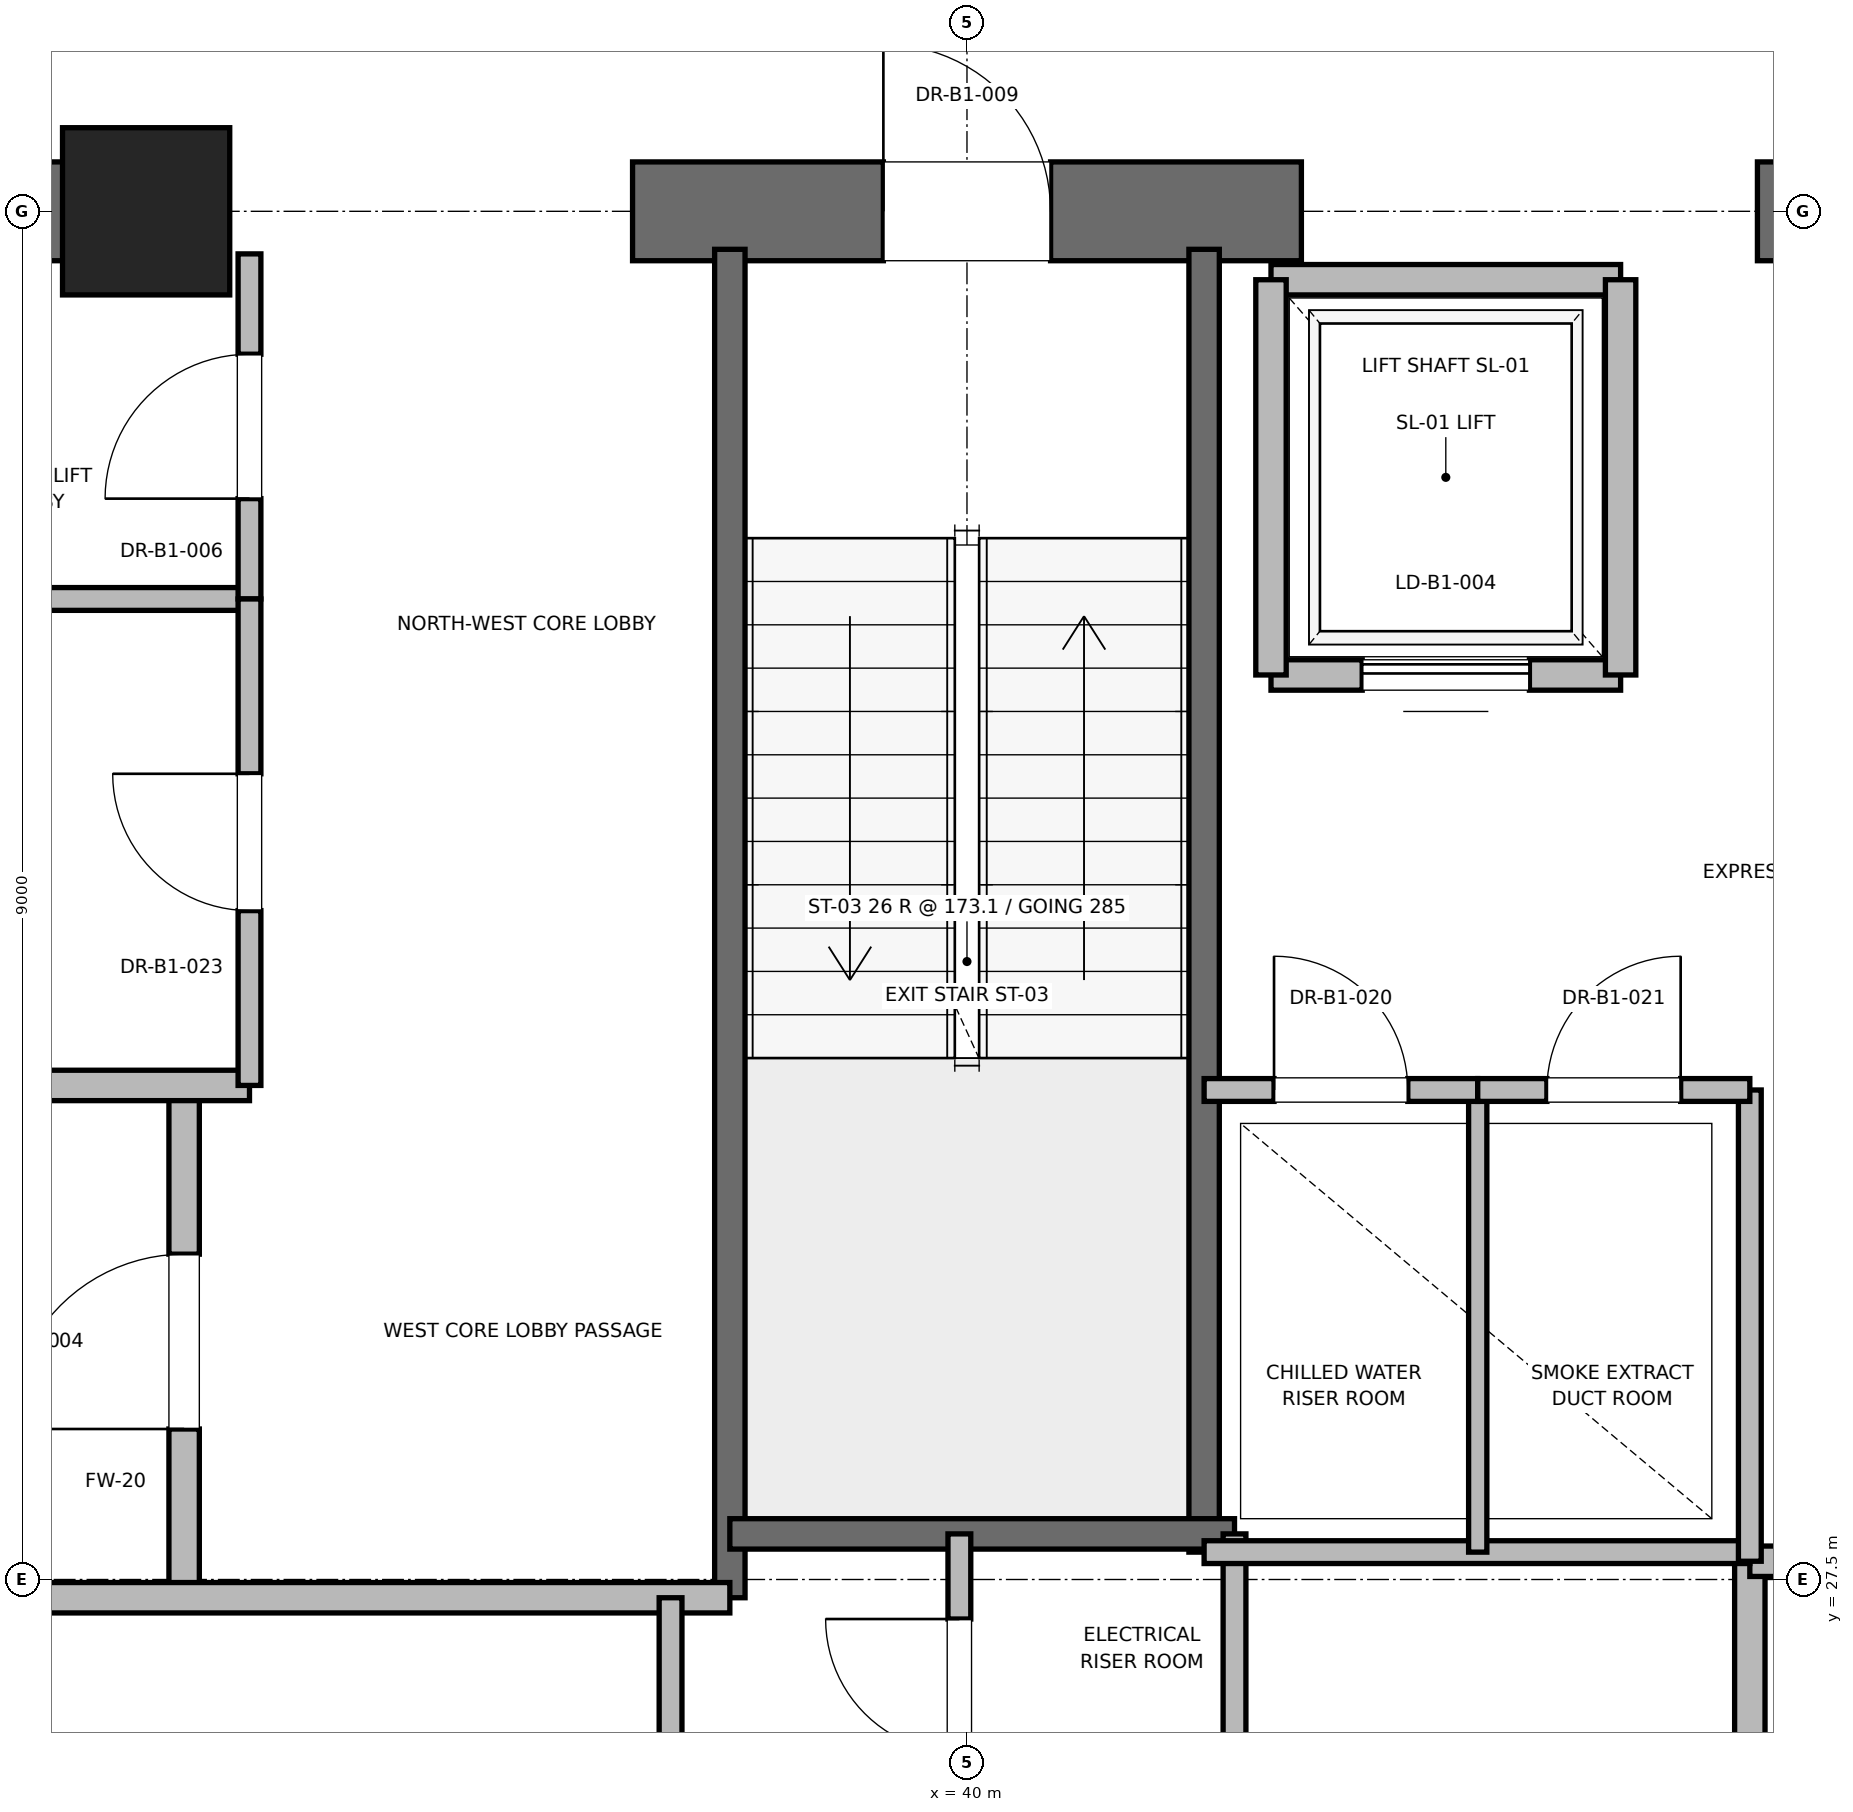
"""IFC4 building model, lengths in metres.
Left out: names, types, materials, properties, quantities, classifications, styles, units other than length and angle.
Written with IfcOpenShell. Run it as: python <this file> out.ifc"""

import sys

from ifc_helpers import new_model, si_unit, direction, frame, frame_2d, origin, origin_2d, place, context, subcontext, project, spatial, rectangle, extrude, element, fill, save


model = new_model("IFC4")
c1 = context("Model", 3, precision=1e-05, world=origin(), true_north=direction((0.0, 1.0)))
c2 = subcontext(c1, "Body", "Model", "MODEL_VIEW")
j1 = project(units=[si_unit("LENGTHUNIT", "METRE"), si_unit("PLANEANGLEUNIT", "RADIAN")], contexts=[c1])
p1 = place(None, origin())
s1 = spatial("IfcSite", under=j1, at=p1, CompositionType="ELEMENT")
p2 = place(p1, origin())
s2 = spatial("IfcBuilding", under=s1, at=p2, CompositionType="ELEMENT")
p3 = place(p2, frame((0.0, 0.0, -4.5)))
s3 = spatial("IfcBuildingStorey", under=s2, at=p3, CompositionType="ELEMENT", Elevation=-4.5)
p4 = place(p3, frame((34.6, 36.5, 0.0), z_axis=(0.0, 0.0, 1.0), x_axis=(1.0, 0.0, 0.0)))
e1 = element("IfcColumn", 1, at=p4, inside=s3, PredefinedType="PILASTER", context=c2, shape_type="SweptSolid", body=[
    extrude(rectangle(XDim=1.1, YDim=1.1, at=origin_2d()), origin(), (0.0, 0.0, 1.0), 4.5),
])
p5 = place(p3, frame((29.0, 36.5, 0.0), z_axis=(0.0, 0.0, 1.0), x_axis=(1.0, 0.0, 0.0)))
e2 = element("IfcWall", 2, at=p5, inside=s3, PredefinedType="SHEAR", context=c2, shape_type="SweptSolid", body=[
    extrude(rectangle(XDim=5.8, YDim=0.65, at=frame_2d((2.9, 0.0))), origin(), (0.0, 0.0, 1.0), 4.22),
])
p6 = place(p3, frame((37.8, 36.5, 0.0), z_axis=(0.0, 0.0, 1.0), x_axis=(1.0, 0.0, 0.0)))
e3 = element("IfcWall", 3, at=p6, inside=s3, PredefinedType="SHEAR", context=c2, shape_type="SweptSolid", body=[
    extrude(rectangle(XDim=4.4, YDim=0.65, at=frame_2d((2.2, 0.0))), origin(), (0.0, 0.0, 1.0), 4.22),
])
p7 = place(p6, frame((1.65, 0.0, 0.0)))
e4 = element("IfcOpeningElement", 4, at=p7, cuts=e3, PredefinedType="OPENING", context=c2, shape_type="SweptSolid", body=[
    extrude(rectangle(XDim=1.1, YDim=2.15, at=frame_2d((0.55, 1.075))), frame((0.0, 0.325, 0.0), z_axis=(0.0, -1.0, 0.0), x_axis=(1.0, 0.0, 0.0)), (0.0, 0.0, 1.0), 0.65),
])
p8 = place(p3, frame((45.2, 36.5, 0.0), z_axis=(0.0, 0.0, 1.0), x_axis=(1.0, 0.0, 0.0)))
e5 = element("IfcWall", 5, at=p8, inside=s3, PredefinedType="SHEAR", context=c2, shape_type="SweptSolid", body=[
    extrude(rectangle(XDim=5.8, YDim=0.65, at=frame_2d((2.9, 0.0))), origin(), (0.0, 0.0, 1.0), 4.22),
])
p9 = place(p3, frame((38.44, 27.38, 0.0), z_axis=(0.0, 0.0, 1.0), x_axis=(0.0, 1.0, 0.0)))
e6 = element("IfcWall", 6, at=p9, inside=s3, PredefinedType="SOLIDWALL", context=c2, shape_type="SweptSolid", body=[
    extrude(rectangle(XDim=8.87, YDim=0.2, at=frame_2d((4.435, 0.0))), origin(), (0.0, 0.0, 1.0), 4.22),
])
p10 = place(p3, frame((41.56, 27.68, 0.0), z_axis=(0.0, 0.0, 1.0), x_axis=(0.0, 1.0, 0.0)))
e7 = element("IfcWall", 7, at=p10, inside=s3, PredefinedType="SOLIDWALL", context=c2, shape_type="SweptSolid", body=[
    extrude(rectangle(XDim=8.57, YDim=0.2, at=frame_2d((4.285, 0.0))), origin(), (0.0, 0.0, 1.0), 4.22),
])
p11 = place(p3, frame((38.44, 27.8, 0.0), z_axis=(0.0, 0.0, 1.0), x_axis=(1.0, 0.0, 0.0)))
e8 = element("IfcWall", 8, at=p11, inside=s3, PredefinedType="SOLIDWALL", context=c2, shape_type="SweptSolid", body=[
    extrude(rectangle(XDim=3.32, YDim=0.2, at=frame_2d((1.66, 0.0))), origin(), (0.0, 0.0, 1.0), 4.22),
])
p12 = place(p3, frame((34.85, 27.38, 0.0), z_axis=(0.0, 0.0, 1.0), x_axis=(0.0, 1.0, 0.0)))
e9 = element("IfcWall", 9, at=p12, inside=s3, PredefinedType="PARTITIONING", context=c2, shape_type="SweptSolid", body=[
    extrude(rectangle(XDim=3.37, YDim=0.2, at=frame_2d((1.685, 0.0))), origin(), (0.0, 0.0, 1.0), 4.22),
])
p13 = place(p12, frame((1.11, 0.0, 0.0)))
e10 = element("IfcOpeningElement", 10, at=p13, cuts=e9, PredefinedType="OPENING", context=c2, shape_type="SweptSolid", body=[
    extrude(rectangle(XDim=1.15, YDim=2.2, at=frame_2d((0.575, 1.1))), frame((0.0, 0.1, 0.0), z_axis=(0.0, -1.0, 0.0), x_axis=(1.0, 0.0, 0.0)), (0.0, 0.0, 1.0), 0.2),
])
p14 = place(p3, frame((32.82, 27.38, 0.0), z_axis=(0.0, 0.0, 1.0), x_axis=(1.0, 0.0, 0.0)))
e11 = element("IfcWall", 11, at=p14, inside=s3, PredefinedType="PARTITIONING", context=c2, shape_type="SweptSolid", body=[
    extrude(rectangle(XDim=5.62, YDim=0.2, at=frame_2d((2.81, 0.0))), origin(), (0.0, 0.0, 1.0), 4.22),
])
p15 = place(p3, frame((32.15, 30.75, 0.0), z_axis=(0.0, 0.0, 1.0), x_axis=(1.0, 0.0, 0.0)))
e12 = element("IfcWall", 12, at=p15, inside=s3, PredefinedType="PARTITIONING", context=c2, shape_type="SweptSolid", body=[
    extrude(rectangle(XDim=3.13, YDim=0.2, at=frame_2d((1.565, 0.0))), origin(), (0.0, 0.0, 1.0), 4.22),
])
p16 = place(p3, frame((45.15, 24.25, 0.0), z_axis=(0.0, 0.0, 1.0), x_axis=(0.0, 1.0, 0.0)))
e13 = element("IfcWall", 13, at=p16, inside=s3, PredefinedType="PARTITIONING", context=c2, shape_type="SweptSolid", body=[
    extrude(rectangle(XDim=3.37, YDim=0.2, at=frame_2d((1.685, 0.0))), origin(), (0.0, 0.0, 1.0), 4.22),
])
p17 = place(p3, frame((45.15, 27.62, 0.0), z_axis=(0.0, 0.0, 1.0), x_axis=(1.0, 0.0, 0.0)))
e14 = element("IfcWall", 14, at=p17, inside=s3, PredefinedType="PARTITIONING", context=c2, shape_type="SweptSolid", body=[
    extrude(rectangle(XDim=2.03, YDim=0.2, at=frame_2d((1.015, 0.0))), origin(), (0.0, 0.0, 1.0), 4.22),
])
p18 = place(p17, frame((0.44, 0.0, 0.0)))
e15 = element("IfcOpeningElement", 15, at=p18, cuts=e14, PredefinedType="OPENING", context=c2, shape_type="SweptSolid", body=[
    extrude(rectangle(XDim=1.15, YDim=2.2, at=frame_2d((0.575, 1.1))), frame((0.0, 0.1, 0.0), z_axis=(0.0, -1.0, 0.0), x_axis=(1.0, 0.0, 0.0)), (0.0, 0.0, 1.0), 0.2),
])
p19 = place(p3, frame((42.0, 33.45, 0.0), z_axis=(0.0, 0.0, 1.0), x_axis=(1.0, 0.0, 0.0)))
e16 = element("IfcWall", 16, at=p19, inside=s3, PredefinedType="SOLIDWALL", context=c2, shape_type="SweptSolid", body=[
    extrude(rectangle(XDim=2.3, YDim=0.2, at=frame_2d((1.15, 0.0))), origin(), (0.0, 0.0, 1.0), 4.22),
])
p20 = place(p19, frame((0.6, 0.0, 0.0)))
e17 = element("IfcOpeningElement", 17, at=p20, cuts=e16, PredefinedType="OPENING", context=c2, shape_type="SweptSolid", body=[
    extrude(rectangle(XDim=1.1, YDim=2.2, at=frame_2d((0.55, 1.1))), frame((0.0, 0.1, 0.0), z_axis=(0.0, -1.0, 0.0), x_axis=(1.0, 0.0, 0.0)), (0.0, 0.0, 1.0), 0.2),
])
p21 = place(p3, frame((44.3, 36.05, 0.0), z_axis=(0.0, 0.0, 1.0), x_axis=(-1.0, 0.0, 0.0)))
e18 = element("IfcWall", 18, at=p21, inside=s3, PredefinedType="SOLIDWALL", context=c2, shape_type="SweptSolid", body=[
    extrude(rectangle(XDim=2.3, YDim=0.2, at=frame_2d((1.15, 0.0))), origin(), (0.0, 0.0, 1.0), 3.0),
])
for number, where, z_axis, x_axis in (
    (19, (42.0, 36.05, 0.0), (0.0, 0.0, 1.0), (0.0, -1.0, 0.0)),
    (20, (44.3, 33.45, 0.0), (0.0, 0.0, 1.0), (0.0, 1.0, 0.0)),
):
    element("IfcWall", number, at=place(p3, frame(where, z_axis=z_axis, x_axis=x_axis)), inside=s3, PredefinedType="SOLIDWALL", context=c2, shape_type="SweptSolid", body=[
        extrude(rectangle(XDim=2.6, YDim=0.2, at=frame_2d((1.3, 0.0))), origin(), (0.0, 0.0, 1.0), 3.0),
    ])
p22 = place(p3, frame((41.76, 23.8, 0.0), z_axis=(0.0, 0.0, 1.0), x_axis=(0.0, 1.0, 0.0)))
e21 = element("IfcWall", 21, at=p22, inside=s3, PredefinedType="PARTITIONING", context=c2, shape_type="SweptSolid", body=[
    extrude(rectangle(XDim=4.0, YDim=0.15, at=frame_2d((2.0, 0.0))), origin(), (0.0, 0.0, 1.0), 2.85),
])
p23 = place(p3, frame((39.95, 25.8, 0.0), z_axis=(0.0, 0.0, 1.0), x_axis=(0.0, 1.0, 0.0)))
e22 = element("IfcWall", 22, at=p23, inside=s3, PredefinedType="PARTITIONING", context=c2, shape_type="SweptSolid", body=[
    extrude(rectangle(XDim=2.0, YDim=0.15, at=frame_2d((1.0, 0.0))), origin(), (0.0, 0.0, 1.0), 2.85),
])
p24 = place(p23, frame((0.56, 0.0, 0.0)))
e23 = element("IfcOpeningElement", 23, at=p24, cuts=e22, PredefinedType="OPENING", context=c2, shape_type="SweptSolid", body=[
    extrude(rectangle(XDim=0.88, YDim=2.1, at=frame_2d((0.44, 1.05))), frame((0.0, 0.075, 0.0), z_axis=(0.0, -1.0, 0.0), x_axis=(1.0, 0.0, 0.0)), (0.0, 0.0, 1.0), 0.15),
])
p25 = place(p3, frame((32.15, 33.95, 0.0), z_axis=(0.0, 0.0, 1.0), x_axis=(1.0, 0.0, 0.0)))
e24 = element("IfcWall", 24, at=p25, inside=s3, PredefinedType="PARTITIONING", context=c2, shape_type="SweptSolid", body=[
    extrude(rectangle(XDim=3.13, YDim=0.15, at=frame_2d((1.565, 0.0))), origin(), (0.0, 0.0, 1.0), 2.85),
])
p26 = place(p3, frame((35.28, 33.95, 0.0), z_axis=(0.0, 0.0, 1.0), x_axis=(0.0, 1.0, 0.0)))
e25 = element("IfcWall", 25, at=p26, inside=s3, PredefinedType="PARTITIONING", context=c2, shape_type="SweptSolid", body=[
    extrude(rectangle(XDim=2.27, YDim=0.15, at=frame_2d((1.135, 0.0))), origin(), (0.0, 0.0, 1.0), 2.85),
])
p27 = place(p26, frame((0.66, 0.0, 0.0)))
e26 = element("IfcOpeningElement", 26, at=p27, cuts=e25, PredefinedType="OPENING", context=c2, shape_type="SweptSolid", body=[
    extrude(rectangle(XDim=0.95, YDim=2.15, at=frame_2d((0.475, 1.075))), frame((0.0, 0.075, 0.0), z_axis=(0.0, -1.0, 0.0), x_axis=(1.0, 0.0, 0.0)), (0.0, 0.0, 1.0), 0.15),
])
p28 = place(p3, frame((35.28, 30.75, 0.0), z_axis=(0.0, 0.0, 1.0), x_axis=(0.0, 1.0, 0.0)))
e27 = element("IfcWall", 27, at=p28, inside=s3, PredefinedType="PARTITIONING", context=c2, shape_type="SweptSolid", body=[
    extrude(rectangle(XDim=3.2, YDim=0.15, at=frame_2d((1.6, 0.0))), origin(), (0.0, 0.0, 1.0), 2.85),
])
p29 = place(p28, frame((1.15, 0.0, 0.0)))
e28 = element("IfcOpeningElement", 28, at=p29, cuts=e27, PredefinedType="OPENING", context=c2, shape_type="SweptSolid", body=[
    extrude(rectangle(XDim=0.9, YDim=2.1, at=frame_2d((0.45, 1.05))), frame((0.0, 0.075, 0.0), z_axis=(0.0, -1.0, 0.0), x_axis=(1.0, 0.0, 0.0)), (0.0, 0.0, 1.0), 0.15),
])
p30 = place(p3, frame((38.05, 23.06, 0.0), z_axis=(0.0, 0.0, 1.0), x_axis=(0.0, 1.0, 0.0)))
e29 = element("IfcWall", 29, at=p30, inside=s3, PredefinedType="PARTITIONING", context=c2, shape_type="SweptSolid", body=[
    extrude(rectangle(XDim=4.32, YDim=0.15, at=frame_2d((2.16, 0.0))), origin(), (0.0, 0.0, 1.0), 2.85),
])
p31 = place(p30, frame((1.72, 0.0, 0.0)))
e30 = element("IfcOpeningElement", 30, at=p31, cuts=e29, PredefinedType="OPENING", context=c2, shape_type="SweptSolid", body=[
    extrude(rectangle(XDim=0.88, YDim=2.1, at=frame_2d((0.44, 1.05))), frame((0.0, 0.075, 0.0), z_axis=(0.0, -1.0, 0.0), x_axis=(1.0, 0.0, 0.0)), (0.0, 0.0, 1.0), 0.15),
])
p32 = place(p3, frame((41.56, 27.68, 0.0), z_axis=(0.0, 0.0, 1.0), x_axis=(1.0, 0.0, 0.0)))
e31 = element("IfcWall", 31, at=p32, inside=s3, PredefinedType="PARTITIONING", context=c2, shape_type="SweptSolid", body=[
    extrude(rectangle(XDim=3.59, YDim=0.15, at=frame_2d((1.795, 0.0))), origin(), (0.0, 0.0, 1.0), 2.85),
])
p33 = place(p3, frame((45.15, 27.62, 0.0), z_axis=(0.0, 0.0, 1.0), x_axis=(0.0, 1.0, 0.0)))
e32 = element("IfcWall", 32, at=p33, inside=s3, PredefinedType="PARTITIONING", context=c2, shape_type="SweptSolid", body=[
    extrude(rectangle(XDim=3.1, YDim=0.15, at=frame_2d((1.55, 0.0))), origin(), (0.0, 0.0, 1.0), 2.85),
])
p34 = place(p3, frame((43.36, 27.68, 0.0), z_axis=(0.0, 0.0, 1.0), x_axis=(0.0, 1.0, 0.0)))
e33 = element("IfcWall", 33, at=p34, inside=s3, PredefinedType="PARTITIONING", context=c2, shape_type="SweptSolid", body=[
    extrude(rectangle(XDim=3.04, YDim=0.12, at=frame_2d((1.52, 0.0))), origin(), (0.0, 0.0, 1.0), 2.85),
])
p35 = place(p3, frame((41.56, 30.72, 0.0), z_axis=(0.0, 0.0, 1.0), x_axis=(1.0, 0.0, 0.0)))
e34 = element("IfcWall", 34, at=p35, inside=s3, PredefinedType="PARTITIONING", context=c2, shape_type="SweptSolid", body=[
    extrude(rectangle(XDim=1.8, YDim=0.15, at=frame_2d((0.9, 0.0))), origin(), (0.0, 0.0, 1.0), 2.85),
])
p36 = place(p35, frame((0.46, 0.0, 0.0)))
e35 = element("IfcOpeningElement", 35, at=p36, cuts=e34, PredefinedType="OPENING", context=c2, shape_type="SweptSolid", body=[
    extrude(rectangle(XDim=0.88, YDim=2.1, at=frame_2d((0.44, 1.05))), frame((0.0, 0.075, 0.0), z_axis=(0.0, -1.0, 0.0), x_axis=(1.0, 0.0, 0.0)), (0.0, 0.0, 1.0), 0.15),
])
p37 = place(p3, frame((43.36, 30.72, 0.0), z_axis=(0.0, 0.0, 1.0), x_axis=(1.0, 0.0, 0.0)))
e36 = element("IfcWall", 36, at=p37, inside=s3, PredefinedType="PARTITIONING", context=c2, shape_type="SweptSolid", body=[
    extrude(rectangle(XDim=1.79, YDim=0.15, at=frame_2d((0.895, 0.0))), origin(), (0.0, 0.0, 1.0), 2.85),
])
p38 = place(p37, frame((0.455, 0.0, 0.0)))
e37 = element("IfcOpeningElement", 37, at=p38, cuts=e36, PredefinedType="OPENING", context=c2, shape_type="SweptSolid", body=[
    extrude(rectangle(XDim=0.88, YDim=2.1, at=frame_2d((0.44, 1.05))), frame((0.0, 0.075, 0.0), z_axis=(0.0, -1.0, 0.0), x_axis=(1.0, 0.0, 0.0)), (0.0, 0.0, 1.0), 0.15),
])
p39 = place(p7, origin())
e38 = element("IfcDoor", 38, at=p39, inside=s3, OperationType="SINGLE_SWING_LEFT", PredefinedType="DOOR", context=c2, shape_type="SweptSolid", body=[
    extrude(rectangle(XDim=1.1, YDim=2.15, at=frame_2d((0.55, 1.075))), frame((0.0, 0.025, 0.0), z_axis=(0.0, -1.0, 0.0), x_axis=(1.0, 0.0, 0.0)), (0.0, 0.0, 1.0), 0.05),
])
fill(e4, e38)
p40 = place(p13, origin())
e39 = element("IfcDoor", 39, at=p40, inside=s3, OperationType="SINGLE_SWING_LEFT", PredefinedType="DOOR", context=c2, shape_type="SweptSolid", body=[
    extrude(rectangle(XDim=1.15, YDim=2.2, at=frame_2d((0.575, 1.1))), frame((0.0, 0.025, 0.0), z_axis=(0.0, -1.0, 0.0), x_axis=(1.0, 0.0, 0.0)), (0.0, 0.0, 1.0), 0.05),
])
fill(e10, e39)
p41 = place(p20, origin())
e40 = element("IfcDoor", 40, at=p41, inside=s3, OperationType="SLIDING_TO_RIGHT", PredefinedType="DOOR", context=c2, shape_type="SweptSolid", body=[
    extrude(rectangle(XDim=1.1, YDim=2.2, at=frame_2d((0.55, 1.1))), frame((0.0, 0.025, 0.0), z_axis=(0.0, -1.0, 0.0), x_axis=(1.0, 0.0, 0.0)), (0.0, 0.0, 1.0), 0.05),
])
fill(e17, e40)
p42 = place(p24, origin())
e41 = element("IfcDoor", 41, at=p42, inside=s3, OperationType="SINGLE_SWING_RIGHT", PredefinedType="DOOR", context=c2, shape_type="SweptSolid", body=[
    extrude(rectangle(XDim=0.88, YDim=2.1, at=frame_2d((0.44, 1.05))), frame((0.0, 0.025, 0.0), z_axis=(0.0, -1.0, 0.0), x_axis=(1.0, 0.0, 0.0)), (0.0, 0.0, 1.0), 0.05),
])
fill(e23, e41)
p43 = place(p27, origin())
e42 = element("IfcDoor", 42, at=p43, inside=s3, OperationType="SINGLE_SWING_LEFT", PredefinedType="DOOR", context=c2, shape_type="SweptSolid", body=[
    extrude(rectangle(XDim=0.95, YDim=2.15, at=frame_2d((0.475, 1.075))), frame((0.0, 0.025, 0.0), z_axis=(0.0, -1.0, 0.0), x_axis=(1.0, 0.0, 0.0)), (0.0, 0.0, 1.0), 0.05),
])
fill(e26, e42)
p44 = place(p29, origin())
e43 = element("IfcDoor", 43, at=p44, inside=s3, OperationType="SINGLE_SWING_RIGHT", PredefinedType="DOOR", context=c2, shape_type="SweptSolid", body=[
    extrude(rectangle(XDim=0.9, YDim=2.1, at=frame_2d((0.45, 1.05))), frame((0.0, 0.025, 0.0), z_axis=(0.0, -1.0, 0.0), x_axis=(1.0, 0.0, 0.0)), (0.0, 0.0, 1.0), 0.05),
])
fill(e28, e43)
p45 = place(p36, origin())
e44 = element("IfcDoor", 44, at=p45, inside=s3, OperationType="SINGLE_SWING_LEFT", PredefinedType="DOOR", context=c2, shape_type="SweptSolid", body=[
    extrude(rectangle(XDim=0.88, YDim=2.1, at=frame_2d((0.44, 1.05))), frame((0.0, 0.025, 0.0), z_axis=(0.0, -1.0, 0.0), x_axis=(1.0, 0.0, 0.0)), (0.0, 0.0, 1.0), 0.05),
])
fill(e35, e44)
p46 = place(p38, origin())
e45 = element("IfcDoor", 45, at=p46, inside=s3, OperationType="SINGLE_SWING_RIGHT", PredefinedType="DOOR", context=c2, shape_type="SweptSolid", body=[
    extrude(rectangle(XDim=0.88, YDim=2.1, at=frame_2d((0.44, 1.05))), frame((0.0, 0.025, 0.0), z_axis=(0.0, -1.0, 0.0), x_axis=(1.0, 0.0, 0.0)), (0.0, 0.0, 1.0), 0.05),
])
fill(e37, e45)
save(model, sys.argv[1])
